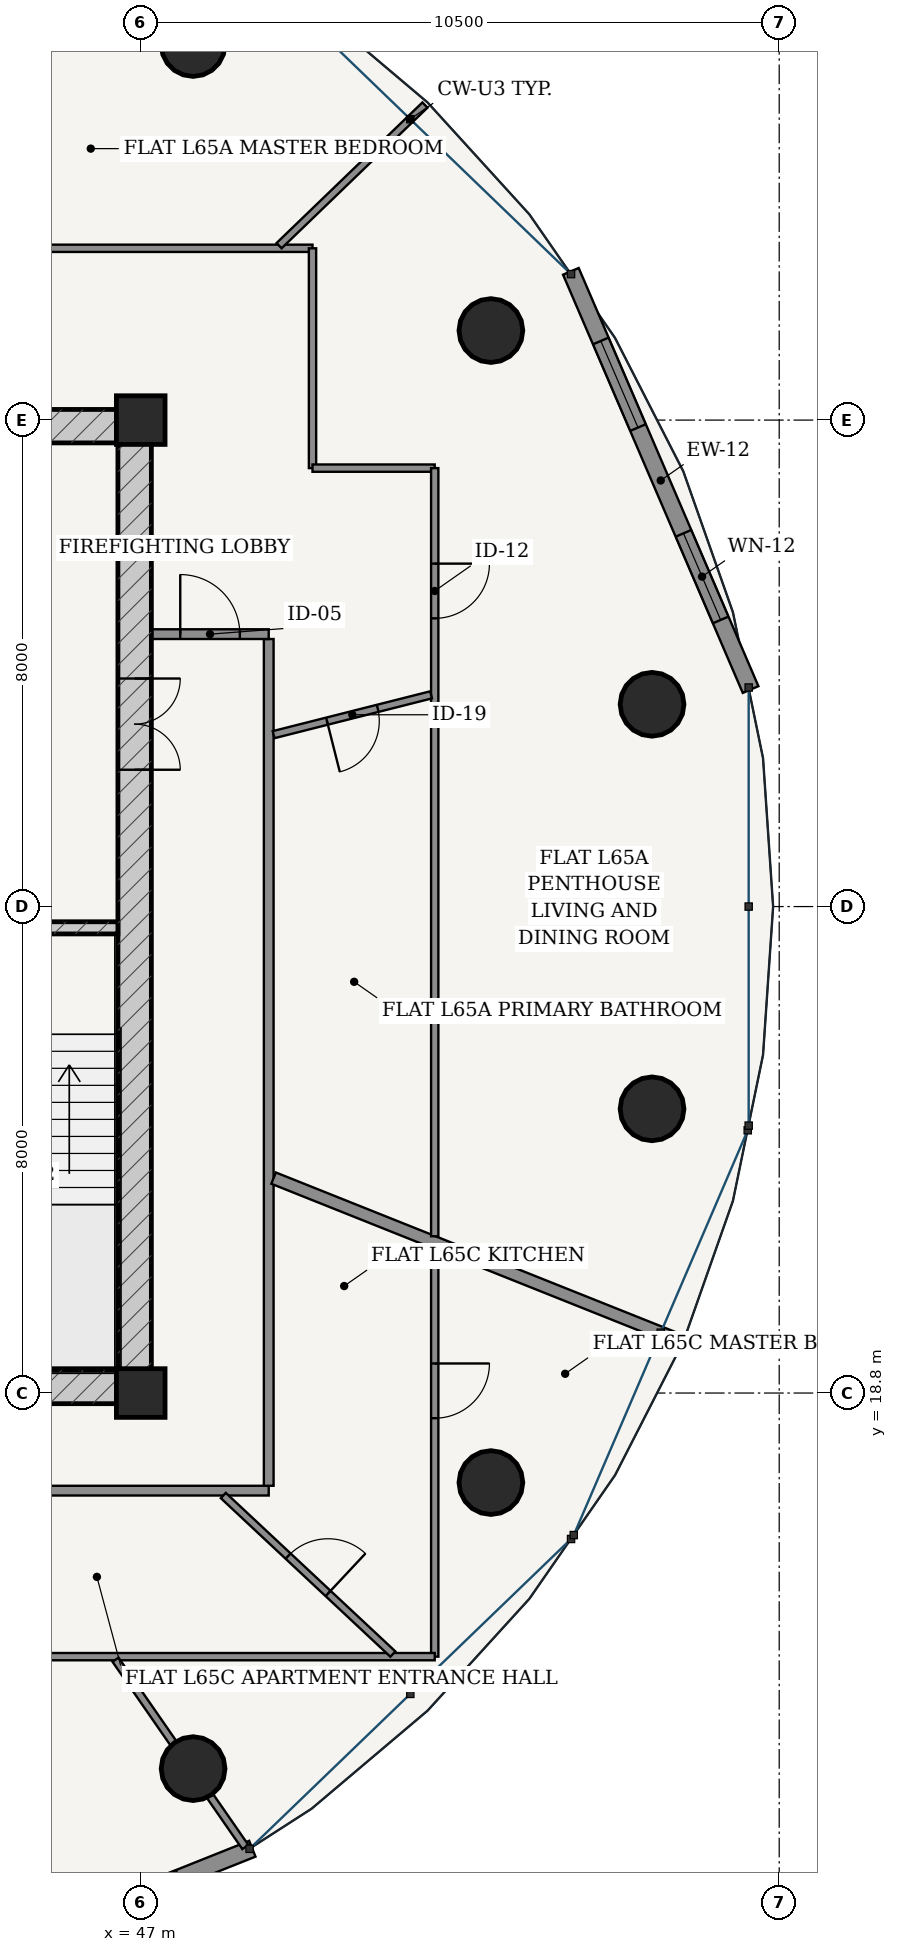
"""IFC4 building model, lengths in metres.
Left out: names, types, materials, properties, quantities, classifications, styles, units other than length and angle.
Written with IfcOpenShell. Run it as: python <this file> out.ifc"""

import sys

from ifc_helpers import new_model, si_unit, direction, frame, frame_2d, origin, origin_2d, place, context, subcontext, project, spatial, rectangle, hollow_circle, extrude, source, transform, mapped, element, fill, save


model = new_model("IFC4")
c1 = context("Model", 3, precision=1e-05, world=origin(), true_north=direction((-0.2419218956, 0.970295726276)))
c2 = subcontext(c1, "Body", "Model", "MODEL_VIEW")
j1 = project(units=[si_unit("LENGTHUNIT", "METRE"), si_unit("PLANEANGLEUNIT", "RADIAN")], contexts=[c1])
p1 = place(None, origin())
s1 = spatial("IfcSite", under=j1, at=p1, CompositionType="ELEMENT")
p2 = place(p1, origin())
s2 = spatial("IfcBuilding", under=s1, at=p2, CompositionType="ELEMENT")
p3 = place(p2, frame((0.0, 0.0, 248.2)))
s3 = spatial("IfcBuildingStorey", under=s2, at=p3, CompositionType="ELEMENT", Elevation=248.2)
for number, where, z_axis, x_axis in (
    (1, (47.0, 18.8, 0.0), (0.0, 0.0, 1.0), (1.0, 0.0, 0.0)),
    (2, (47.0, 34.8, 0.0), (0.0, 0.0, 1.0), (1.0, 0.0, 0.0)),
):
    element("IfcColumn", number, at=place(p3, frame(where, z_axis=z_axis, x_axis=x_axis)), inside=s3, PredefinedType="COLUMN", context=c2, shape_type="SweptSolid", body=[
        extrude(rectangle(XDim=0.8, YDim=0.8, at=origin_2d()), origin(), (0.0, 0.0, 1.0), 3.75),
    ])
p4 = place(p3, frame((28.825, 18.9, 0.0), z_axis=(0.0, 0.0, 1.0), x_axis=(1.0, 0.0, 0.0)))
e3 = element("IfcWall", 3, at=p4, inside=s3, PredefinedType="SHEAR", context=c2, shape_type="SweptSolid", body=[
    extrude(rectangle(XDim=18.35, YDim=0.55, at=frame_2d((9.175, 0.0))), origin(), (0.0, 0.0, 1.0), 3.49),
])
p5 = place(p4, frame((7.41, 0.0, 0.0)))
e4 = element("IfcOpeningElement", 4, at=p5, cuts=e3, PredefinedType="OPENING", context=c2, shape_type="SweptSolid", body=[
    extrude(rectangle(XDim=0.85, YDim=2.1, at=frame_2d((0.425, 1.05))), frame((0.0, 0.285, 0.0), z_axis=(0.0, -1.0, 0.0), x_axis=(1.0, 0.0, 0.0)), (0.0, 0.0, 1.0), 0.57),
])
p6 = place(p4, frame((10.49, 0.0, 0.0)))
e5 = element("IfcOpeningElement", 5, at=p6, cuts=e3, PredefinedType="OPENING", context=c2, shape_type="SweptSolid", body=[
    extrude(rectangle(XDim=0.85, YDim=2.1, at=frame_2d((0.425, 1.05))), frame((0.0, 0.285, 0.0), z_axis=(0.0, -1.0, 0.0), x_axis=(1.0, 0.0, 0.0)), (0.0, 0.0, 1.0), 0.57),
])
p7 = place(p3, frame((28.825, 34.7, 0.0), z_axis=(0.0, 0.0, 1.0), x_axis=(1.0, 0.0, 0.0)))
e6 = element("IfcWall", 6, at=p7, inside=s3, PredefinedType="SHEAR", context=c2, shape_type="SweptSolid", body=[
    extrude(rectangle(XDim=18.35, YDim=0.55, at=frame_2d((9.175, 0.0))), origin(), (0.0, 0.0, 1.0), 3.49),
])
p8 = place(p3, frame((46.9, 19.175, 0.0), z_axis=(0.0, 0.0, 1.0), x_axis=(0.0, 1.0, 0.0)))
e7 = element("IfcWall", 7, at=p8, inside=s3, PredefinedType="SHEAR", context=c2, shape_type="SweptSolid", body=[
    extrude(rectangle(XDim=15.25, YDim=0.55, at=frame_2d((7.625, 0.0))), origin(), (0.0, 0.0, 1.0), 3.49),
])
p9 = place(p8, frame((9.875, 0.0, 0.0)))
e8 = element("IfcOpeningElement", 8, at=p9, cuts=e7, PredefinedType="OPENING", context=c2, shape_type="SweptSolid", body=[
    extrude(rectangle(XDim=1.5, YDim=2.2, at=frame_2d((0.75, 1.1))), frame((0.0, 0.285, 0.0), z_axis=(0.0, -1.0, 0.0), x_axis=(1.0, 0.0, 0.0)), (0.0, 0.0, 1.0), 0.57),
])
p10 = place(p3, frame((43.305, 26.45, 0.0), z_axis=(0.0, 0.0, 1.0), x_axis=(1.0, 0.0, 0.0)))
e9 = element("IfcWall", 9, at=p10, inside=s3, PredefinedType="SOLIDWALL", context=c2, shape_type="SweptSolid", body=[
    extrude(rectangle(XDim=3.32, YDim=0.2, at=frame_2d((1.66, 0.0))), origin(), (0.0, 0.0, 1.0), 3.49),
])
p11 = place(p10, frame((1.185, 0.0, 0.0)))
e10 = element("IfcOpeningElement", 10, at=p11, cuts=e9, PredefinedType="OPENING", context=c2, shape_type="SweptSolid", body=[
    extrude(rectangle(XDim=0.95, YDim=2.15, at=frame_2d((0.475, 1.075))), frame((0.0, 0.11, 0.0), z_axis=(0.0, -1.0, 0.0), x_axis=(1.0, 0.0, 0.0)), (0.0, 0.0, 1.0), 0.22),
])
for number, where, z_axis, x_axis in (
    (11, (55.409, 30.126, 0.0), (0.0, 0.0, 1.0), (1.0, 0.0, 0.0)),
    (12, (52.759, 36.272, 0.0), (0.0, 0.0, 1.0), (1.0, 0.0, 0.0)),
    (13, (47.861, 40.977, 0.0), (0.0, 0.0, 1.0), (1.0, 0.0, 0.0)),
    (14, (47.861, 12.624, 0.0), (0.0, 0.0, 1.0), (1.0, 0.0, 0.0)),
    (15, (52.759, 17.328, 0.0), (0.0, 0.0, 1.0), (1.0, 0.0, 0.0)),
    (16, (55.409, 23.474, 0.0), (0.0, 0.0, 1.0), (1.0, 0.0, 0.0)),
):
    element("IfcColumn", number, at=place(p3, frame(where, z_axis=z_axis, x_axis=x_axis)), inside=s3, PredefinedType="COLUMN", context=c2, shape_type="SweptSolid", body=[
        extrude(hollow_circle(Radius=0.525, WallThickness=0.035, at=origin_2d()), origin(), (0.0, 0.0, 1.0), 3.75),
    ])
p12 = place(p3, frame((57.029, 30.369, 0.0), z_axis=(0.0, 0.0, 1.0), x_axis=(-0.394816612978, 0.918759948037, 0.0)))
e17 = element("IfcWall", 17, at=p12, inside=s3, PredefinedType="SOLIDWALL", context=c2, shape_type="SweptSolid", body=[
    extrude(rectangle(XDim=7.485, YDim=0.28, at=frame_2d((3.743, 0.0))), origin(), (0.0, 0.0, 1.0), 3.49),
])
p13 = place(p12, frame((1.246, 0.0, 0.85)))
e18 = element("IfcOpeningElement", 18, at=p13, cuts=e17, PredefinedType="OPENING", context=c2, shape_type="SweptSolid", body=[
    extrude(rectangle(XDim=1.55, YDim=1.95, at=frame_2d((0.775, 0.975))), frame((0.0, 0.15, 0.0), z_axis=(0.0, -1.0, 0.0), x_axis=(1.0, 0.0, 0.0)), (0.0, 0.0, 1.0), 0.3),
])
p14 = place(p12, frame((4.689, 0.0, 0.85)))
e19 = element("IfcOpeningElement", 19, at=p14, cuts=e17, PredefinedType="OPENING", context=c2, shape_type="SweptSolid", body=[
    extrude(rectangle(XDim=1.55, YDim=1.95, at=frame_2d((0.775, 0.975))), frame((0.0, 0.15, 0.0), z_axis=(0.0, -1.0, 0.0), x_axis=(1.0, 0.0, 0.0)), (0.0, 0.0, 1.0), 0.3),
])
p15 = place(p3, frame((41.705, 8.459, 0.0), z_axis=(0.0, 0.0, 1.0), x_axis=(0.92871332341, 0.370798547626, 0.0)))
e20 = element("IfcWall", 20, at=p15, inside=s3, PredefinedType="SOLIDWALL", context=c2, shape_type="SweptSolid", body=[
    extrude(rectangle(XDim=7.678, YDim=0.28, at=frame_2d((3.839, 0.0))), origin(), (0.0, 0.0, 1.0), 3.49),
])
p16 = place(p15, frame((1.298, 0.0, 0.85)))
e21 = element("IfcOpeningElement", 21, at=p16, cuts=e20, PredefinedType="OPENING", context=c2, shape_type="SweptSolid", body=[
    extrude(rectangle(XDim=1.55, YDim=1.95, at=frame_2d((0.775, 0.975))), frame((0.0, 0.15, 0.0), z_axis=(0.0, -1.0, 0.0), x_axis=(1.0, 0.0, 0.0)), (0.0, 0.0, 1.0), 0.3),
])
p17 = place(p15, frame((4.83, 0.0, 0.85)))
e22 = element("IfcOpeningElement", 22, at=p17, cuts=e20, PredefinedType="OPENING", context=c2, shape_type="SweptSolid", body=[
    extrude(rectangle(XDim=1.55, YDim=1.95, at=frame_2d((0.775, 0.975))), frame((0.0, 0.15, 0.0), z_axis=(0.0, -1.0, 0.0), x_axis=(1.0, 0.0, 0.0)), (0.0, 0.0, 1.0), 0.3),
])
p18 = place(p3, frame((26.895, 17.195, 0.0), z_axis=(0.0, 0.0, 1.0), x_axis=(1.0, 0.0, 0.0)))
e23 = element("IfcWall", 23, at=p18, inside=s3, PredefinedType="PARTITIONING", context=c2, shape_type="SweptSolid", body=[
    extrude(rectangle(XDim=22.21, YDim=0.16, at=frame_2d((11.105, 0.0))), origin(), (0.0, 0.0, 1.0), 3.015),
])
p19 = place(p18, frame((2.861, 0.0, 0.0)))
e24 = element("IfcOpeningElement", 24, at=p19, cuts=e23, PredefinedType="OPENING", context=c2, shape_type="SweptSolid", body=[
    extrude(rectangle(XDim=0.98, YDim=2.2, at=frame_2d((0.49, 1.1))), frame((0.0, 0.09, 0.0), z_axis=(0.0, -1.0, 0.0), x_axis=(1.0, 0.0, 0.0)), (0.0, 0.0, 1.0), 0.18),
])
p20 = place(p18, frame((16.97, 0.0, 0.0)))
e25 = element("IfcOpeningElement", 25, at=p20, cuts=e23, PredefinedType="OPENING", context=c2, shape_type="SweptSolid", body=[
    extrude(rectangle(XDim=0.98, YDim=2.2, at=frame_2d((0.49, 1.1))), frame((0.0, 0.09, 0.0), z_axis=(0.0, -1.0, 0.0), x_axis=(1.0, 0.0, 0.0)), (0.0, 0.0, 1.0), 0.18),
])
p21 = place(p3, frame((49.105, 17.275, 0.0), z_axis=(0.0, 0.0, 1.0), x_axis=(0.0, 1.0, 0.0)))
e26 = element("IfcWall", 26, at=p21, inside=s3, PredefinedType="PARTITIONING", context=c2, shape_type="SweptSolid", body=[
    extrude(rectangle(XDim=13.925, YDim=0.16, at=frame_2d((6.962, 0.0))), origin(), (0.0, 0.0, 1.0), 3.015),
])
p22 = place(p3, frame((47.175, 31.28, 0.0), z_axis=(0.0, 0.0, 1.0), x_axis=(1.0, 0.0, 0.0)))
e27 = element("IfcWall", 27, at=p22, inside=s3, PredefinedType="PARTITIONING", context=c2, shape_type="SweptSolid", body=[
    extrude(rectangle(XDim=1.93, YDim=0.16, at=frame_2d((0.965, 0.0))), origin(), (0.0, 0.0, 1.0), 3.49),
])
p23 = place(p22, frame((0.475, 0.0, 0.0)))
e28 = element("IfcOpeningElement", 28, at=p23, cuts=e27, PredefinedType="OPENING", context=c2, shape_type="SweptSolid", body=[
    extrude(rectangle(XDim=0.98, YDim=2.2, at=frame_2d((0.49, 1.1))), frame((0.0, 0.09, 0.0), z_axis=(0.0, -1.0, 0.0), x_axis=(1.0, 0.0, 0.0)), (0.0, 0.0, 1.0), 0.18),
])
p24 = place(p3, frame((49.185, 22.334, 0.0), z_axis=(0.0, 0.0, 1.0), x_axis=(0.928710518269, -0.370805573389, 0.0)))
e29 = element("IfcWall", 29, at=p24, inside=s3, PredefinedType="PARTITIONING", context=c2, shape_type="SweptSolid", body=[
    extrude(rectangle(XDim=7.195, YDim=0.2, at=frame_2d((3.598, 0.0))), origin(), (0.0, 0.0, 1.0), 3.121),
])
p25 = place(p3, frame((26.175, 37.625, 0.0), z_axis=(0.0, 0.0, 1.0), x_axis=(1.0, 0.0, 0.0)))
e30 = element("IfcWall", 30, at=p25, inside=s3, PredefinedType="PARTITIONING", context=c2, shape_type="SweptSolid", body=[
    extrude(rectangle(XDim=23.65, YDim=0.12, at=frame_2d((11.825, 0.0))), origin(), (0.0, 0.0, 1.0), 3.015),
])
p26 = place(p25, frame((12.791, 0.0, 0.0)))
e31 = element("IfcOpeningElement", 31, at=p26, cuts=e30, PredefinedType="OPENING", context=c2, shape_type="SweptSolid", body=[
    extrude(rectangle(XDim=0.9, YDim=2.15, at=frame_2d((0.45, 1.075))), frame((0.0, 0.07, 0.0), z_axis=(0.0, -1.0, 0.0), x_axis=(1.0, 0.0, 0.0)), (0.0, 0.0, 1.0), 0.14),
])
p27 = place(p25, frame((6.48, 0.0, 0.0)))
e32 = element("IfcOpeningElement", 32, at=p27, cuts=e30, PredefinedType="OPENING", context=c2, shape_type="SweptSolid", body=[
    extrude(rectangle(XDim=0.9, YDim=2.15, at=frame_2d((0.45, 1.075))), frame((0.0, 0.07, 0.0), z_axis=(0.0, -1.0, 0.0), x_axis=(1.0, 0.0, 0.0)), (0.0, 0.0, 1.0), 0.14),
])
p28 = place(p25, frame((1.831, 0.0, 0.0)))
e33 = element("IfcOpeningElement", 33, at=p28, cuts=e30, PredefinedType="OPENING", context=c2, shape_type="SweptSolid", body=[
    extrude(rectangle(XDim=0.9, YDim=2.15, at=frame_2d((0.45, 1.075))), frame((0.0, 0.07, 0.0), z_axis=(0.0, -1.0, 0.0), x_axis=(1.0, 0.0, 0.0)), (0.0, 0.0, 1.0), 0.14),
])
p29 = place(p3, frame((49.825, 37.625, 0.0), z_axis=(0.0, 0.0, 1.0), x_axis=(0.0, -1.0, 0.0)))
e34 = element("IfcWall", 34, at=p29, inside=s3, PredefinedType="PARTITIONING", context=c2, shape_type="SweptSolid", body=[
    extrude(rectangle(XDim=3.615, YDim=0.12, at=frame_2d((1.808, 0.0))), origin(), (0.0, 0.0, 1.0), 3.015),
])
p30 = place(p3, frame((49.825, 34.01, 0.0), z_axis=(0.0, 0.0, 1.0), x_axis=(1.0, 0.0, 0.0)))
e35 = element("IfcWall", 35, at=p30, inside=s3, PredefinedType="PARTITIONING", context=c2, shape_type="SweptSolid", body=[
    extrude(rectangle(XDim=2.01, YDim=0.12, at=frame_2d((1.005, 0.0))), origin(), (0.0, 0.0, 1.0), 3.209),
])
p31 = place(p3, frame((51.835, 34.01, 0.0), z_axis=(0.0, 0.0, 1.0), x_axis=(0.0, -1.0, 0.0)))
e36 = element("IfcWall", 36, at=p31, inside=s3, PredefinedType="PARTITIONING", context=c2, shape_type="SweptSolid", body=[
    extrude(rectangle(XDim=12.632, YDim=0.12, at=frame_2d((6.316, 0.0))), origin(), (0.0, 0.0, 1.0), 3.015),
])
p32 = place(p31, frame((1.57, 0.0, 0.0)))
e37 = element("IfcOpeningElement", 37, at=p32, cuts=e36, PredefinedType="OPENING", context=c2, shape_type="SweptSolid", body=[
    extrude(rectangle(XDim=0.9, YDim=2.15, at=frame_2d((0.45, 1.075))), frame((0.0, 0.07, 0.0), z_axis=(0.0, -1.0, 0.0), x_axis=(1.0, 0.0, 0.0)), (0.0, 0.0, 1.0), 0.14),
])
p33 = place(p3, frame((49.275, 37.668, 0.0), z_axis=(0.0, 0.0, 1.0), x_axis=(0.719954096891, 0.694021684366, 0.0)))
e38 = element("IfcWall", 38, at=p33, inside=s3, PredefinedType="PARTITIONING", context=c2, shape_type="SweptSolid", body=[
    extrude(rectangle(XDim=3.333, YDim=0.12, at=frame_2d((1.667, 0.0))), origin(), (0.0, 0.0, 1.0), 3.121),
])
p34 = place(p3, frame((49.185, 29.627, 0.0), z_axis=(0.0, 0.0, 1.0), x_axis=(0.969515658159, 0.2450293627, 0.0)))
e39 = element("IfcWall", 39, at=p34, inside=s3, PredefinedType="PARTITIONING", context=c2, shape_type="SweptSolid", body=[
    extrude(rectangle(XDim=2.671, YDim=0.12, at=frame_2d((1.336, 0.0))), origin(), (0.0, 0.0, 1.0), 3.209),
])
p35 = place(p34, frame((0.906, 0.0, 0.0)))
e40 = element("IfcOpeningElement", 40, at=p35, cuts=e39, PredefinedType="OPENING", context=c2, shape_type="SweptSolid", body=[
    extrude(rectangle(XDim=0.86, YDim=2.15, at=frame_2d((0.43, 1.075))), frame((0.0, 0.07, 0.0), z_axis=(0.0, -1.0, 0.0), x_axis=(1.0, 0.0, 0.0)), (0.0, 0.0, 1.0), 0.14),
])
p36 = place(p3, frame((51.835, 21.174, 0.0), z_axis=(0.0, 0.0, 1.0), x_axis=(0.0, -1.0, 0.0)))
e41 = element("IfcWall", 41, at=p36, inside=s3, PredefinedType="PARTITIONING", context=c2, shape_type="SweptSolid", body=[
    extrude(rectangle(XDim=6.709, YDim=0.12, at=frame_2d((3.354, 0.0))), origin(), (0.0, 0.0, 1.0), 3.015),
])
p37 = place(p36, frame((1.888, 0.0, 0.0)))
e42 = element("IfcOpeningElement", 42, at=p37, cuts=e41, PredefinedType="OPENING", context=c2, shape_type="SweptSolid", body=[
    extrude(rectangle(XDim=0.9, YDim=2.15, at=frame_2d((0.45, 1.075))), frame((0.0, 0.07, 0.0), z_axis=(0.0, -1.0, 0.0), x_axis=(1.0, 0.0, 0.0)), (0.0, 0.0, 1.0), 0.14),
])
p38 = place(p3, frame((51.835, 14.465, 0.0), z_axis=(0.0, 0.0, 1.0), x_axis=(-1.0, 0.0, 0.0)))
e43 = element("IfcWall", 43, at=p38, inside=s3, PredefinedType="PARTITIONING", context=c2, shape_type="SweptSolid", body=[
    extrude(rectangle(XDim=16.278, YDim=0.12, at=frame_2d((8.139, 0.0))), origin(), (0.0, 0.0, 1.0), 3.015),
])
p39 = place(p38, frame((7.665, 0.0, 0.0)))
e44 = element("IfcOpeningElement", 44, at=p39, cuts=e43, PredefinedType="OPENING", context=c2, shape_type="SweptSolid", body=[
    extrude(rectangle(XDim=0.9, YDim=2.15, at=frame_2d((0.45, 1.075))), frame((0.0, 0.07, 0.0), z_axis=(0.0, -1.0, 0.0), x_axis=(1.0, 0.0, 0.0)), (0.0, 0.0, 1.0), 0.14),
])
p40 = place(p3, frame((46.586, 14.414, 0.0), z_axis=(0.0, 0.0, 1.0), x_axis=(0.569657021681, -0.821882520589, 0.0)))
e45 = element("IfcWall", 45, at=p40, inside=s3, PredefinedType="PARTITIONING", context=c2, shape_type="SweptSolid", body=[
    extrude(rectangle(XDim=3.748, YDim=0.12, at=frame_2d((1.874, 0.0))), origin(), (0.0, 0.0, 1.0), 3.015),
])
p41 = place(p3, frame((48.358, 17.115, 0.0), z_axis=(0.0, 0.0, 1.0), x_axis=(0.730431927487, -0.682985504464, 0.0)))
e46 = element("IfcWall", 46, at=p41, inside=s3, PredefinedType="PARTITIONING", context=c2, shape_type="SweptSolid", body=[
    extrude(rectangle(XDim=3.818, YDim=0.12, at=frame_2d((1.909, 0.0))), origin(), (0.0, 0.0, 1.0), 3.121),
])
p42 = place(p41, frame((1.459, 0.0, 0.0)))
e47 = element("IfcOpeningElement", 47, at=p42, cuts=e46, PredefinedType="OPENING", context=c2, shape_type="SweptSolid", body=[
    extrude(rectangle(XDim=0.9, YDim=2.15, at=frame_2d((0.45, 1.075))), frame((0.0, 0.07, 0.0), z_axis=(0.0, -1.0, 0.0), x_axis=(1.0, 0.0, 0.0)), (0.0, 0.0, 1.0), 0.14),
])
m1 = source(origin(), c2, "Body", "SweptSolid", [
    extrude(rectangle(XDim=1.55, YDim=1.95, at=frame_2d((0.775, 0.975))), frame((0.0, 0.03, 0.0), z_axis=(0.0, -1.0, 0.0), x_axis=(1.0, 0.0, 0.0)), (0.0, 0.0, 1.0), 0.06),
])
p43 = place(p13, origin())
e48 = element("IfcWindow", 48, at=p43, inside=s3, PartitioningType="SINGLE_PANEL", PredefinedType="WINDOW", context=c2, shape_type="MappedRepresentation", body=[
    mapped(m1, transform((0.0, 0.0, 0.0), scale=1.0)),
])
fill(e18, e48)
p44 = place(p14, origin())
e49 = element("IfcWindow", 49, at=p44, inside=s3, PartitioningType="SINGLE_PANEL", PredefinedType="WINDOW", context=c2, shape_type="MappedRepresentation", body=[
    mapped(m1, transform((0.0, 0.0, 0.0), scale=1.0)),
])
fill(e19, e49)
m2 = source(origin(), c2, "Body", "SweptSolid", [
    extrude(rectangle(XDim=1.5, YDim=2.2, at=frame_2d((0.75, 1.1))), frame((0.0, 0.025, 0.0), z_axis=(0.0, -1.0, 0.0), x_axis=(1.0, 0.0, 0.0)), (0.0, 0.0, 1.0), 0.05),
])
p45 = place(p9, frame((1.5, 0.0, 0.0), z_axis=(0.0, 0.0, 1.0), x_axis=(-1.0, 0.0, 0.0)))
e50 = element("IfcDoor", 50, at=p45, inside=s3, OperationType="DOUBLE_DOOR_SINGLE_SWING", PredefinedType="DOOR", context=c2, shape_type="MappedRepresentation", body=[
    mapped(m2, transform((0.0, 0.0, 0.0), scale=1.0)),
])
fill(e8, e50)
m3 = source(origin(), c2, "Body", "SweptSolid", [
    extrude(rectangle(XDim=0.98, YDim=2.2, at=frame_2d((0.49, 1.1))), frame((0.0, 0.025, 0.0), z_axis=(0.0, -1.0, 0.0), x_axis=(1.0, 0.0, 0.0)), (0.0, 0.0, 1.0), 0.05),
])
p46 = place(p23, origin())
e51 = element("IfcDoor", 51, at=p46, inside=s3, OperationType="SINGLE_SWING_LEFT", PredefinedType="DOOR", context=c2, shape_type="MappedRepresentation", body=[
    mapped(m3, transform((0.0, 0.0, 0.0), scale=1.0)),
])
fill(e28, e51)
m4 = source(origin(), c2, "Body", "SweptSolid", [
    extrude(rectangle(XDim=0.86, YDim=2.15, at=frame_2d((0.43, 1.075))), frame((0.0, 0.025, 0.0), z_axis=(0.0, -1.0, 0.0), x_axis=(1.0, 0.0, 0.0)), (0.0, 0.0, 1.0), 0.05),
])
p47 = place(p35, frame((0.86, 0.0, 0.0), z_axis=(0.0, 0.0, 1.0), x_axis=(-1.0, 0.0, 0.0)))
e52 = element("IfcDoor", 52, at=p47, inside=s3, OperationType="SINGLE_SWING_RIGHT", PredefinedType="DOOR", context=c2, shape_type="MappedRepresentation", body=[
    mapped(m4, transform((0.0, 0.0, 0.0), scale=1.0)),
])
fill(e40, e52)
m5 = source(origin(), c2, "Body", "SweptSolid", [
    extrude(rectangle(XDim=0.9, YDim=2.15, at=frame_2d((0.45, 1.075))), frame((0.0, 0.025, 0.0), z_axis=(0.0, -1.0, 0.0), x_axis=(1.0, 0.0, 0.0)), (0.0, 0.0, 1.0), 0.05),
])
p48 = place(p32, origin())
e53 = element("IfcDoor", 53, at=p48, inside=s3, OperationType="SINGLE_SWING_LEFT", PredefinedType="DOOR", context=c2, shape_type="MappedRepresentation", body=[
    mapped(m5, transform((0.0, 0.0, 0.0), scale=1.0)),
])
fill(e37, e53)
p49 = place(p42, origin())
e54 = element("IfcDoor", 54, at=p49, inside=s3, OperationType="SINGLE_SWING_RIGHT", PredefinedType="DOOR", context=c2, shape_type="MappedRepresentation", body=[
    mapped(m5, transform((0.0, 0.0, 0.0), scale=1.0)),
])
fill(e47, e54)
p50 = place(p37, origin())
e55 = element("IfcDoor", 55, at=p50, inside=s3, OperationType="SINGLE_SWING_LEFT", PredefinedType="DOOR", context=c2, shape_type="MappedRepresentation", body=[
    mapped(m5, transform((0.0, 0.0, 0.0), scale=1.0)),
])
fill(e42, e55)
save(model, sys.argv[1])
